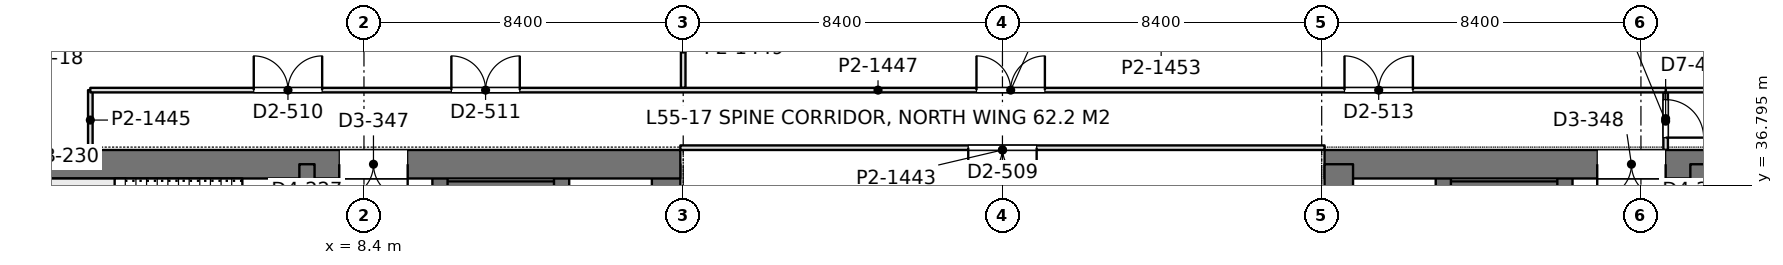
"""IFC4 building model, lengths in metres.
Left out: names, types, materials, properties, quantities, classifications, styles, units other than length and angle.
Written with IfcOpenShell. Run it as: python <this file> out.ifc"""

import sys

from ifc_helpers import new_model, si_unit, direction, frame, frame_2d, origin, place, context, subcontext, project, spatial, rectangle, extrude, element, fill, save


model = new_model("IFC4")
c1 = context("Model", 3, precision=1e-05, world=origin(), true_north=direction((0.0, 1.0)))
c2 = subcontext(c1, "Body", "Model", "MODEL_VIEW")
j1 = project(units=[si_unit("LENGTHUNIT", "METRE"), si_unit("PLANEANGLEUNIT", "RADIAN")], contexts=[c1])
p1 = place(None, origin())
s1 = spatial("IfcSite", under=j1, at=p1, CompositionType="ELEMENT")
p2 = place(p1, origin())
s2 = spatial("IfcBuilding", under=s1, at=p2, CompositionType="ELEMENT")
p3 = place(p2, frame((0.0, 0.0, 240.6)))
s3 = spatial("IfcBuildingStorey", under=s2, at=p3, CompositionType="ELEMENT", Elevation=240.6)
p4 = place(p3, frame((-1.125, 37.35, 0.0), z_axis=(0.0, 0.0, 1.0), x_axis=(1.0, 0.0, 0.0)))
e1 = element("IfcWall", 1, at=p4, inside=s3, PredefinedType="SHEAR", context=c2, shape_type="SweptSolid", body=[
    extrude(rectangle(XDim=17.85, YDim=0.75, at=frame_2d((8.925, 0.0))), origin(), (0.0, 0.0, 1.0), 4.2),
])
p5 = place(p4, frame((8.875, 0.0, 0.0)))
e2 = element("IfcOpeningElement", 2, at=p5, cuts=e1, PredefinedType="OPENING", context=c2, shape_type="SweptSolid", body=[
    extrude(rectangle(XDim=1.8, YDim=2.4, at=frame_2d((0.9, 1.2))), frame((0.0, 0.385, 0.0), z_axis=(0.0, -1.0, 0.0), x_axis=(1.0, 0.0, 0.0)), (0.0, 0.0, 1.0), 0.77),
])
p6 = place(p3, frame((16.35, 27.8, 0.0), z_axis=(0.0, 0.0, 1.0), x_axis=(0.0, 1.0, 0.0)))
e3 = element("IfcWall", 3, at=p6, inside=s3, PredefinedType="SHEAR", context=c2, shape_type="SweptSolid", body=[
    extrude(rectangle(XDim=9.55, YDim=0.75, at=frame_2d((4.775, 0.0))), origin(), (0.0, 0.0, 1.0), 4.2),
])
p7 = place(p3, frame((6.9, 13.05, 0.0), z_axis=(0.0, 0.0, 1.0), x_axis=(0.0, 1.0, 0.0)))
e4 = element("IfcWall", 4, at=p7, inside=s3, PredefinedType="SHEAR", context=c2, shape_type="SweptSolid", body=[
    extrude(rectangle(XDim=24.3, YDim=0.4, at=frame_2d((12.15, 0.0))), origin(), (0.0, 0.0, 1.0), 4.2),
])
p8 = place(p7, frame((1.3, 0.0, 0.0)))
e5 = element("IfcOpeningElement", 5, at=p8, cuts=e4, PredefinedType="OPENING", context=c2, shape_type="SweptSolid", body=[
    extrude(rectangle(XDim=1.0, YDim=2.2, at=frame_2d((0.5, 1.1))), frame((0.0, 0.21, 0.0), z_axis=(0.0, -1.0, 0.0), x_axis=(1.0, 0.0, 0.0)), (0.0, 0.0, 1.0), 0.42),
])
p9 = place(p7, frame((22.0, 0.0, 0.0)))
e6 = element("IfcOpeningElement", 6, at=p9, cuts=e4, PredefinedType="OPENING", context=c2, shape_type="SweptSolid", body=[
    extrude(rectangle(XDim=1.0, YDim=2.2, at=frame_2d((0.5, 1.1))), frame((0.0, 0.21, 0.0), z_axis=(0.0, -1.0, 0.0), x_axis=(1.0, 0.0, 0.0)), (0.0, 0.0, 1.0), 0.42),
])
p10 = place(p7, frame((5.55, 0.0, 0.0)))
e7 = element("IfcOpeningElement", 7, at=p10, cuts=e4, PredefinedType="OPENING", context=c2, shape_type="SweptSolid", body=[
    extrude(rectangle(XDim=1.0, YDim=2.2, at=frame_2d((0.5, 1.1))), frame((0.0, 0.21, 0.0), z_axis=(0.0, -1.0, 0.0), x_axis=(1.0, 0.0, 0.0)), (0.0, 0.0, 1.0), 0.42),
])
p11 = place(p7, frame((9.55, 0.0, 0.0)))
e8 = element("IfcOpeningElement", 8, at=p11, cuts=e4, PredefinedType="OPENING", context=c2, shape_type="SweptSolid", body=[
    extrude(rectangle(XDim=1.0, YDim=2.2, at=frame_2d((0.5, 1.1))), frame((0.0, 0.21, 0.0), z_axis=(0.0, -1.0, 0.0), x_axis=(1.0, 0.0, 0.0)), (0.0, 0.0, 1.0), 0.42),
])
p12 = place(p7, frame((12.8, 0.0, 0.0)))
e9 = element("IfcOpeningElement", 9, at=p12, cuts=e4, PredefinedType="OPENING", context=c2, shape_type="SweptSolid", body=[
    extrude(rectangle(XDim=1.1, YDim=2.2, at=frame_2d((0.55, 1.1))), frame((0.0, 0.21, 0.0), z_axis=(0.0, -1.0, 0.0), x_axis=(1.0, 0.0, 0.0)), (0.0, 0.0, 1.0), 0.42),
])
p13 = place(p7, frame((15.538, 0.0, 0.0)))
e10 = element("IfcOpeningElement", 10, at=p13, cuts=e4, PredefinedType="OPENING", context=c2, shape_type="SweptSolid", body=[
    extrude(rectangle(XDim=1.1, YDim=2.2, at=frame_2d((0.55, 1.1))), frame((0.0, 0.21, 0.0), z_axis=(0.0, -1.0, 0.0), x_axis=(1.0, 0.0, 0.0)), (0.0, 0.0, 1.0), 0.42),
])
p14 = place(p7, frame((18.262, 0.0, 0.0)))
e11 = element("IfcOpeningElement", 11, at=p14, cuts=e4, PredefinedType="OPENING", context=c2, shape_type="SweptSolid", body=[
    extrude(rectangle(XDim=1.1, YDim=2.2, at=frame_2d((0.55, 1.1))), frame((0.0, 0.21, 0.0), z_axis=(0.0, -1.0, 0.0), x_axis=(1.0, 0.0, 0.0)), (0.0, 0.0, 1.0), 0.42),
])
p15 = place(p3, frame((10.4, 13.05, 0.0), z_axis=(0.0, 0.0, 1.0), x_axis=(0.0, 1.0, 0.0)))
e12 = element("IfcWall", 12, at=p15, inside=s3, PredefinedType="SHEAR", context=c2, shape_type="SweptSolid", body=[
    extrude(rectangle(XDim=24.3, YDim=0.4, at=frame_2d((12.15, 0.0))), origin(), (0.0, 0.0, 1.0), 4.2),
])
p16 = place(p15, frame((15.75, 0.0, 0.0)))
e13 = element("IfcOpeningElement", 13, at=p16, cuts=e12, PredefinedType="OPENING", context=c2, shape_type="SweptSolid", body=[
    extrude(rectangle(XDim=1.1, YDim=2.2, at=frame_2d((0.55, 1.1))), frame((0.0, 0.21, 0.0), z_axis=(0.0, -1.0, 0.0), x_axis=(1.0, 0.0, 0.0)), (0.0, 0.0, 1.0), 0.42),
])
p17 = place(p15, frame((18.6, 0.0, 0.0)))
e14 = element("IfcOpeningElement", 14, at=p17, cuts=e12, PredefinedType="OPENING", context=c2, shape_type="SweptSolid", body=[
    extrude(rectangle(XDim=1.1, YDim=2.2, at=frame_2d((0.55, 1.1))), frame((0.0, 0.21, 0.0), z_axis=(0.0, -1.0, 0.0), x_axis=(1.0, 0.0, 0.0)), (0.0, 0.0, 1.0), 0.42),
])
p18 = place(p15, frame((21.45, 0.0, 0.0)))
e15 = element("IfcOpeningElement", 15, at=p18, cuts=e12, PredefinedType="OPENING", context=c2, shape_type="SweptSolid", body=[
    extrude(rectangle(XDim=1.1, YDim=2.2, at=frame_2d((0.55, 1.1))), frame((0.0, 0.21, 0.0), z_axis=(0.0, -1.0, 0.0), x_axis=(1.0, 0.0, 0.0)), (0.0, 0.0, 1.0), 0.42),
])
p19 = place(p15, frame((8.65, 0.0, 0.0)))
e16 = element("IfcOpeningElement", 16, at=p19, cuts=e12, PredefinedType="OPENING", context=c2, shape_type="SweptSolid", body=[
    extrude(rectangle(XDim=1.8, YDim=2.4, at=frame_2d((0.9, 1.2))), frame((0.0, 0.21, 0.0), z_axis=(0.0, -1.0, 0.0), x_axis=(1.0, 0.0, 0.0)), (0.0, 0.0, 1.0), 0.42),
])
p20 = place(p3, frame((13.6, 27.925, 0.0), z_axis=(0.0, 0.0, 1.0), x_axis=(0.0, 1.0, 0.0)))
e17 = element("IfcWall", 17, at=p20, inside=s3, PredefinedType="SHEAR", context=c2, shape_type="SweptSolid", body=[
    extrude(rectangle(XDim=9.425, YDim=0.4, at=frame_2d((4.712, 0.0))), origin(), (0.0, 0.0, 1.0), 4.2),
])
p21 = place(p3, frame((10.4, 36.625, 0.0), z_axis=(0.0, 0.0, 1.0), x_axis=(1.0, 0.0, 0.0)))
e18 = element("IfcWall", 18, at=p21, inside=s3, PredefinedType="SHEAR", context=c2, shape_type="SweptSolid", body=[
    extrude(rectangle(XDim=3.2, YDim=0.55, at=frame_2d((1.6, 0.0))), origin(), (0.0, 0.0, 1.0), 4.2),
])
p22 = place(p3, frame((33.675, 37.35, 0.0), z_axis=(0.0, 0.0, 1.0), x_axis=(1.0, 0.0, 0.0)))
e19 = element("IfcWall", 19, at=p22, inside=s3, PredefinedType="SHEAR", context=c2, shape_type="SweptSolid", body=[
    extrude(rectangle(XDim=17.85, YDim=0.75, at=frame_2d((8.925, 0.0))), origin(), (0.0, 0.0, 1.0), 4.2),
])
p23 = place(p22, frame((7.175, 0.0, 0.0)))
e20 = element("IfcOpeningElement", 20, at=p23, cuts=e19, PredefinedType="OPENING", context=c2, shape_type="SweptSolid", body=[
    extrude(rectangle(XDim=1.8, YDim=2.4, at=frame_2d((0.9, 1.2))), frame((0.0, 0.385, 0.0), z_axis=(0.0, -1.0, 0.0), x_axis=(1.0, 0.0, 0.0)), (0.0, 0.0, 1.0), 0.77),
])
p24 = place(p3, frame((34.05, 27.8, 0.0), z_axis=(0.0, 0.0, 1.0), x_axis=(0.0, 1.0, 0.0)))
e21 = element("IfcWall", 21, at=p24, inside=s3, PredefinedType="SHEAR", context=c2, shape_type="SweptSolid", body=[
    extrude(rectangle(XDim=9.55, YDim=0.75, at=frame_2d((4.775, 0.0))), origin(), (0.0, 0.0, 1.0), 4.2),
])
p25 = place(p3, frame((43.5, 13.05, 0.0), z_axis=(0.0, 0.0, 1.0), x_axis=(0.0, 1.0, 0.0)))
e22 = element("IfcWall", 22, at=p25, inside=s3, PredefinedType="SHEAR", context=c2, shape_type="SweptSolid", body=[
    extrude(rectangle(XDim=24.3, YDim=0.4, at=frame_2d((12.15, 0.0))), origin(), (0.0, 0.0, 1.0), 4.2),
])
p26 = place(p25, frame((1.3, 0.0, 0.0)))
e23 = element("IfcOpeningElement", 23, at=p26, cuts=e22, PredefinedType="OPENING", context=c2, shape_type="SweptSolid", body=[
    extrude(rectangle(XDim=1.0, YDim=2.2, at=frame_2d((0.5, 1.1))), frame((0.0, 0.21, 0.0), z_axis=(0.0, -1.0, 0.0), x_axis=(1.0, 0.0, 0.0)), (0.0, 0.0, 1.0), 0.42),
])
p27 = place(p25, frame((22.0, 0.0, 0.0)))
e24 = element("IfcOpeningElement", 24, at=p27, cuts=e22, PredefinedType="OPENING", context=c2, shape_type="SweptSolid", body=[
    extrude(rectangle(XDim=1.0, YDim=2.2, at=frame_2d((0.5, 1.1))), frame((0.0, 0.21, 0.0), z_axis=(0.0, -1.0, 0.0), x_axis=(1.0, 0.0, 0.0)), (0.0, 0.0, 1.0), 0.42),
])
p28 = place(p25, frame((5.55, 0.0, 0.0)))
e25 = element("IfcOpeningElement", 25, at=p28, cuts=e22, PredefinedType="OPENING", context=c2, shape_type="SweptSolid", body=[
    extrude(rectangle(XDim=1.0, YDim=2.2, at=frame_2d((0.5, 1.1))), frame((0.0, 0.21, 0.0), z_axis=(0.0, -1.0, 0.0), x_axis=(1.0, 0.0, 0.0)), (0.0, 0.0, 1.0), 0.42),
])
p29 = place(p25, frame((9.55, 0.0, 0.0)))
e26 = element("IfcOpeningElement", 26, at=p29, cuts=e22, PredefinedType="OPENING", context=c2, shape_type="SweptSolid", body=[
    extrude(rectangle(XDim=1.0, YDim=2.2, at=frame_2d((0.5, 1.1))), frame((0.0, 0.21, 0.0), z_axis=(0.0, -1.0, 0.0), x_axis=(1.0, 0.0, 0.0)), (0.0, 0.0, 1.0), 0.42),
])
p30 = place(p25, frame((12.8, 0.0, 0.0)))
e27 = element("IfcOpeningElement", 27, at=p30, cuts=e22, PredefinedType="OPENING", context=c2, shape_type="SweptSolid", body=[
    extrude(rectangle(XDim=1.1, YDim=2.2, at=frame_2d((0.55, 1.1))), frame((0.0, 0.21, 0.0), z_axis=(0.0, -1.0, 0.0), x_axis=(1.0, 0.0, 0.0)), (0.0, 0.0, 1.0), 0.42),
])
p31 = place(p25, frame((15.538, 0.0, 0.0)))
e28 = element("IfcOpeningElement", 28, at=p31, cuts=e22, PredefinedType="OPENING", context=c2, shape_type="SweptSolid", body=[
    extrude(rectangle(XDim=1.1, YDim=2.2, at=frame_2d((0.55, 1.1))), frame((0.0, 0.21, 0.0), z_axis=(0.0, -1.0, 0.0), x_axis=(1.0, 0.0, 0.0)), (0.0, 0.0, 1.0), 0.42),
])
p32 = place(p25, frame((18.262, 0.0, 0.0)))
e29 = element("IfcOpeningElement", 29, at=p32, cuts=e22, PredefinedType="OPENING", context=c2, shape_type="SweptSolid", body=[
    extrude(rectangle(XDim=1.1, YDim=2.2, at=frame_2d((0.55, 1.1))), frame((0.0, 0.21, 0.0), z_axis=(0.0, -1.0, 0.0), x_axis=(1.0, 0.0, 0.0)), (0.0, 0.0, 1.0), 0.42),
])
p33 = place(p3, frame((40.0, 13.05, 0.0), z_axis=(0.0, 0.0, 1.0), x_axis=(0.0, 1.0, 0.0)))
e30 = element("IfcWall", 30, at=p33, inside=s3, PredefinedType="SHEAR", context=c2, shape_type="SweptSolid", body=[
    extrude(rectangle(XDim=24.3, YDim=0.4, at=frame_2d((12.15, 0.0))), origin(), (0.0, 0.0, 1.0), 4.2),
])
p34 = place(p33, frame((15.75, 0.0, 0.0)))
e31 = element("IfcOpeningElement", 31, at=p34, cuts=e30, PredefinedType="OPENING", context=c2, shape_type="SweptSolid", body=[
    extrude(rectangle(XDim=1.1, YDim=2.2, at=frame_2d((0.55, 1.1))), frame((0.0, 0.21, 0.0), z_axis=(0.0, -1.0, 0.0), x_axis=(1.0, 0.0, 0.0)), (0.0, 0.0, 1.0), 0.42),
])
p35 = place(p33, frame((18.6, 0.0, 0.0)))
e32 = element("IfcOpeningElement", 32, at=p35, cuts=e30, PredefinedType="OPENING", context=c2, shape_type="SweptSolid", body=[
    extrude(rectangle(XDim=1.1, YDim=2.2, at=frame_2d((0.55, 1.1))), frame((0.0, 0.21, 0.0), z_axis=(0.0, -1.0, 0.0), x_axis=(1.0, 0.0, 0.0)), (0.0, 0.0, 1.0), 0.42),
])
p36 = place(p33, frame((21.45, 0.0, 0.0)))
e33 = element("IfcOpeningElement", 33, at=p36, cuts=e30, PredefinedType="OPENING", context=c2, shape_type="SweptSolid", body=[
    extrude(rectangle(XDim=1.1, YDim=2.2, at=frame_2d((0.55, 1.1))), frame((0.0, 0.21, 0.0), z_axis=(0.0, -1.0, 0.0), x_axis=(1.0, 0.0, 0.0)), (0.0, 0.0, 1.0), 0.42),
])
p37 = place(p33, frame((8.65, 0.0, 0.0)))
e34 = element("IfcOpeningElement", 34, at=p37, cuts=e30, PredefinedType="OPENING", context=c2, shape_type="SweptSolid", body=[
    extrude(rectangle(XDim=1.8, YDim=2.4, at=frame_2d((0.9, 1.2))), frame((0.0, 0.21, 0.0), z_axis=(0.0, -1.0, 0.0), x_axis=(1.0, 0.0, 0.0)), (0.0, 0.0, 1.0), 0.42),
])
p38 = place(p3, frame((36.8, 27.925, 0.0), z_axis=(0.0, 0.0, 1.0), x_axis=(0.0, 1.0, 0.0)))
e35 = element("IfcWall", 35, at=p38, inside=s3, PredefinedType="SHEAR", context=c2, shape_type="SweptSolid", body=[
    extrude(rectangle(XDim=9.425, YDim=0.4, at=frame_2d((4.712, 0.0))), origin(), (0.0, 0.0, 1.0), 4.2),
])
p39 = place(p3, frame((40.0, 36.625, 0.0), z_axis=(0.0, 0.0, 1.0), x_axis=(-1.0, 0.0, 0.0)))
e36 = element("IfcWall", 36, at=p39, inside=s3, PredefinedType="SHEAR", context=c2, shape_type="SweptSolid", body=[
    extrude(rectangle(XDim=3.2, YDim=0.55, at=frame_2d((1.6, 0.0))), origin(), (0.0, 0.0, 1.0), 4.2),
])
p40 = place(p3, frame((16.8, 39.358, 0.0), z_axis=(0.0, 0.0, 1.0), x_axis=(0.0, 1.0, 0.0)))
e37 = element("IfcWall", 37, at=p40, inside=s3, PredefinedType="PARTITIONING", context=c2, shape_type="SweptSolid", body=[
    extrude(rectangle(XDim=2.043, YDim=0.12, at=frame_2d((1.021, 0.0))), origin(), (0.0, 0.0, 1.0), 3.543),
])
p41 = place(p3, frame((1.2, 39.3, 0.0), z_axis=(0.0, 0.0, 1.0), x_axis=(1.0, 0.0, 0.0)))
e38 = element("IfcWall", 38, at=p41, inside=s3, PredefinedType="PARTITIONING", context=c2, shape_type="SweptSolid", body=[
    extrude(rectangle(XDim=41.452, YDim=0.12, at=frame_2d((20.726, 0.0))), origin(), (0.0, 0.0, 1.0), 3.3),
])
p42 = place(p41, frame((4.3, 0.0, 0.0)))
e39 = element("IfcOpeningElement", 39, at=p42, cuts=e38, PredefinedType="OPENING", context=c2, shape_type="SweptSolid", body=[
    extrude(rectangle(XDim=1.8, YDim=2.2, at=frame_2d((0.9, 1.1))), frame((0.0, 0.07, 0.0), z_axis=(0.0, -1.0, 0.0), x_axis=(1.0, 0.0, 0.0)), (0.0, 0.0, 1.0), 0.14),
])
p43 = place(p41, frame((9.5, 0.0, 0.0)))
e40 = element("IfcOpeningElement", 40, at=p43, cuts=e38, PredefinedType="OPENING", context=c2, shape_type="SweptSolid", body=[
    extrude(rectangle(XDim=1.8, YDim=2.2, at=frame_2d((0.9, 1.1))), frame((0.0, 0.07, 0.0), z_axis=(0.0, -1.0, 0.0), x_axis=(1.0, 0.0, 0.0)), (0.0, 0.0, 1.0), 0.14),
])
p44 = place(p41, frame((23.317, 0.0, 0.0)))
e41 = element("IfcOpeningElement", 41, at=p44, cuts=e38, PredefinedType="OPENING", context=c2, shape_type="SweptSolid", body=[
    extrude(rectangle(XDim=1.8, YDim=2.2, at=frame_2d((0.9, 1.1))), frame((0.0, 0.07, 0.0), z_axis=(0.0, -1.0, 0.0), x_axis=(1.0, 0.0, 0.0)), (0.0, 0.0, 1.0), 0.14),
])
p45 = place(p41, frame((33.0, 0.0, 0.0)))
e42 = element("IfcOpeningElement", 42, at=p45, cuts=e38, PredefinedType="OPENING", context=c2, shape_type="SweptSolid", body=[
    extrude(rectangle(XDim=1.8, YDim=2.2, at=frame_2d((0.9, 1.1))), frame((0.0, 0.07, 0.0), z_axis=(0.0, -1.0, 0.0), x_axis=(1.0, 0.0, 0.0)), (0.0, 0.0, 1.0), 0.14),
])
p46 = place(p3, frame((1.2, 37.724, 0.0), z_axis=(0.0, 0.0, 1.0), x_axis=(0.0, 1.0, 0.0)))
e43 = element("IfcWall", 43, at=p46, inside=s3, PredefinedType="PARTITIONING", context=c2, shape_type="SweptSolid", body=[
    extrude(rectangle(XDim=1.576, YDim=0.12, at=frame_2d((0.788, 0.0))), origin(), (0.0, 0.0, 1.0), 4.0),
])
p47 = place(p3, frame((42.65, 37.724, 0.0), z_axis=(0.0, 0.0, 1.0), x_axis=(0.0, 1.0, 0.0)))
e44 = element("IfcWall", 44, at=p47, inside=s3, PredefinedType="PARTITIONING", context=c2, shape_type="SweptSolid", body=[
    extrude(rectangle(XDim=1.518, YDim=0.12, at=frame_2d((0.759, 0.0))), origin(), (0.0, 0.0, 1.0), 4.0),
])
p48 = place(p47, frame((0.326, 0.0, 0.0)))
e45 = element("IfcOpeningElement", 45, at=p48, cuts=e44, PredefinedType="OPENING", context=c2, shape_type="SweptSolid", body=[
    extrude(rectangle(XDim=1.0, YDim=2.4, at=frame_2d((0.5, 1.2))), frame((0.0, 0.07, 0.0), z_axis=(0.0, -1.0, 0.0), x_axis=(1.0, 0.0, 0.0)), (0.0, 0.0, 1.0), 0.14),
])
p49 = place(p3, frame((42.648, 39.3, 0.0), z_axis=(0.0, 0.0, 1.0), x_axis=(1.0, 0.0, 0.0)))
e46 = element("IfcWall", 46, at=p49, inside=s3, PredefinedType="PARTITIONING", context=c2, shape_type="SweptSolid", body=[
    extrude(rectangle(XDim=6.552, YDim=0.12, at=frame_2d((3.276, 0.0))), origin(), (0.0, 0.0, 1.0), 3.4),
])
p50 = place(p3, frame((16.725, 37.785, 0.0), z_axis=(0.0, 0.0, 1.0), x_axis=(1.0, 0.0, 0.0)))
e47 = element("IfcWall", 47, at=p50, inside=s3, PredefinedType="PARTITIONING", context=c2, shape_type="SweptSolid", body=[
    extrude(rectangle(XDim=16.95, YDim=0.12, at=frame_2d((8.475, 0.0))), origin(), (0.0, 0.0, 1.0), 3.3),
])
p51 = place(p50, frame((7.575, 0.0, 0.0)))
e48 = element("IfcOpeningElement", 48, at=p51, cuts=e47, PredefinedType="OPENING", context=c2, shape_type="SweptSolid", body=[
    extrude(rectangle(XDim=1.8, YDim=2.2, at=frame_2d((0.9, 1.1))), frame((0.0, 0.07, 0.0), z_axis=(0.0, -1.0, 0.0), x_axis=(1.0, 0.0, 0.0)), (0.0, 0.0, 1.0), 0.14),
])
p52 = place(p5, frame((1.8, 0.0, 0.0), z_axis=(0.0, 0.0, 1.0), x_axis=(-1.0, 0.0, 0.0)))
e49 = element("IfcDoor", 49, at=p52, inside=s3, OperationType="DOUBLE_DOOR_SINGLE_SWING", PredefinedType="DOOR", context=c2, shape_type="SweptSolid", body=[
    extrude(rectangle(XDim=1.8, YDim=2.4, at=frame_2d((0.9, 1.2))), frame((0.0, 0.025, 0.0), z_axis=(0.0, -1.0, 0.0), x_axis=(1.0, 0.0, 0.0)), (0.0, 0.0, 1.0), 0.05),
])
fill(e2, e49)
p53 = place(p23, frame((1.8, 0.0, 0.0), z_axis=(0.0, 0.0, 1.0), x_axis=(-1.0, 0.0, 0.0)))
e50 = element("IfcDoor", 50, at=p53, inside=s3, OperationType="DOUBLE_DOOR_SINGLE_SWING", PredefinedType="DOOR", context=c2, shape_type="SweptSolid", body=[
    extrude(rectangle(XDim=1.8, YDim=2.4, at=frame_2d((0.9, 1.2))), frame((0.0, 0.025, 0.0), z_axis=(0.0, -1.0, 0.0), x_axis=(1.0, 0.0, 0.0)), (0.0, 0.0, 1.0), 0.05),
])
fill(e20, e50)
p54 = place(p42, origin())
e51 = element("IfcDoor", 51, at=p54, inside=s3, OperationType="DOUBLE_DOOR_SINGLE_SWING", PredefinedType="DOOR", context=c2, shape_type="SweptSolid", body=[
    extrude(rectangle(XDim=1.8, YDim=2.2, at=frame_2d((0.9, 1.1))), frame((0.0, 0.025, 0.0), z_axis=(0.0, -1.0, 0.0), x_axis=(1.0, 0.0, 0.0)), (0.0, 0.0, 1.0), 0.05),
])
fill(e39, e51)
p55 = place(p43, origin())
e52 = element("IfcDoor", 52, at=p55, inside=s3, OperationType="DOUBLE_DOOR_SINGLE_SWING", PredefinedType="DOOR", context=c2, shape_type="SweptSolid", body=[
    extrude(rectangle(XDim=1.8, YDim=2.2, at=frame_2d((0.9, 1.1))), frame((0.0, 0.025, 0.0), z_axis=(0.0, -1.0, 0.0), x_axis=(1.0, 0.0, 0.0)), (0.0, 0.0, 1.0), 0.05),
])
fill(e40, e52)
p56 = place(p44, origin())
e53 = element("IfcDoor", 53, at=p56, inside=s3, OperationType="DOUBLE_DOOR_SINGLE_SWING", PredefinedType="DOOR", context=c2, shape_type="SweptSolid", body=[
    extrude(rectangle(XDim=1.8, YDim=2.2, at=frame_2d((0.9, 1.1))), frame((0.0, 0.025, 0.0), z_axis=(0.0, -1.0, 0.0), x_axis=(1.0, 0.0, 0.0)), (0.0, 0.0, 1.0), 0.05),
])
fill(e41, e53)
p57 = place(p45, origin())
e54 = element("IfcDoor", 54, at=p57, inside=s3, OperationType="DOUBLE_DOOR_SINGLE_SWING", PredefinedType="DOOR", context=c2, shape_type="SweptSolid", body=[
    extrude(rectangle(XDim=1.8, YDim=2.2, at=frame_2d((0.9, 1.1))), frame((0.0, 0.025, 0.0), z_axis=(0.0, -1.0, 0.0), x_axis=(1.0, 0.0, 0.0)), (0.0, 0.0, 1.0), 0.05),
])
fill(e42, e54)
p58 = place(p48, frame((1.0, 0.0, 0.0), z_axis=(0.0, 0.0, 1.0), x_axis=(-1.0, 0.0, 0.0)))
e55 = element("IfcDoor", 55, at=p58, inside=s3, OperationType="SINGLE_SWING_RIGHT", PredefinedType="DOOR", context=c2, shape_type="SweptSolid", body=[
    extrude(rectangle(XDim=1.0, YDim=2.4, at=frame_2d((0.5, 1.2))), frame((0.0, 0.025, 0.0), z_axis=(0.0, -1.0, 0.0), x_axis=(1.0, 0.0, 0.0)), (0.0, 0.0, 1.0), 0.05),
])
fill(e45, e55)
p59 = place(p51, frame((1.8, 0.0, 0.0), z_axis=(0.0, 0.0, 1.0), x_axis=(-1.0, 0.0, 0.0)))
e56 = element("IfcDoor", 56, at=p59, inside=s3, OperationType="DOUBLE_DOOR_SINGLE_SWING", PredefinedType="DOOR", context=c2, shape_type="SweptSolid", body=[
    extrude(rectangle(XDim=1.8, YDim=2.2, at=frame_2d((0.9, 1.1))), frame((0.0, 0.025, 0.0), z_axis=(0.0, -1.0, 0.0), x_axis=(1.0, 0.0, 0.0)), (0.0, 0.0, 1.0), 0.05),
])
fill(e48, e56)
save(model, sys.argv[1])
